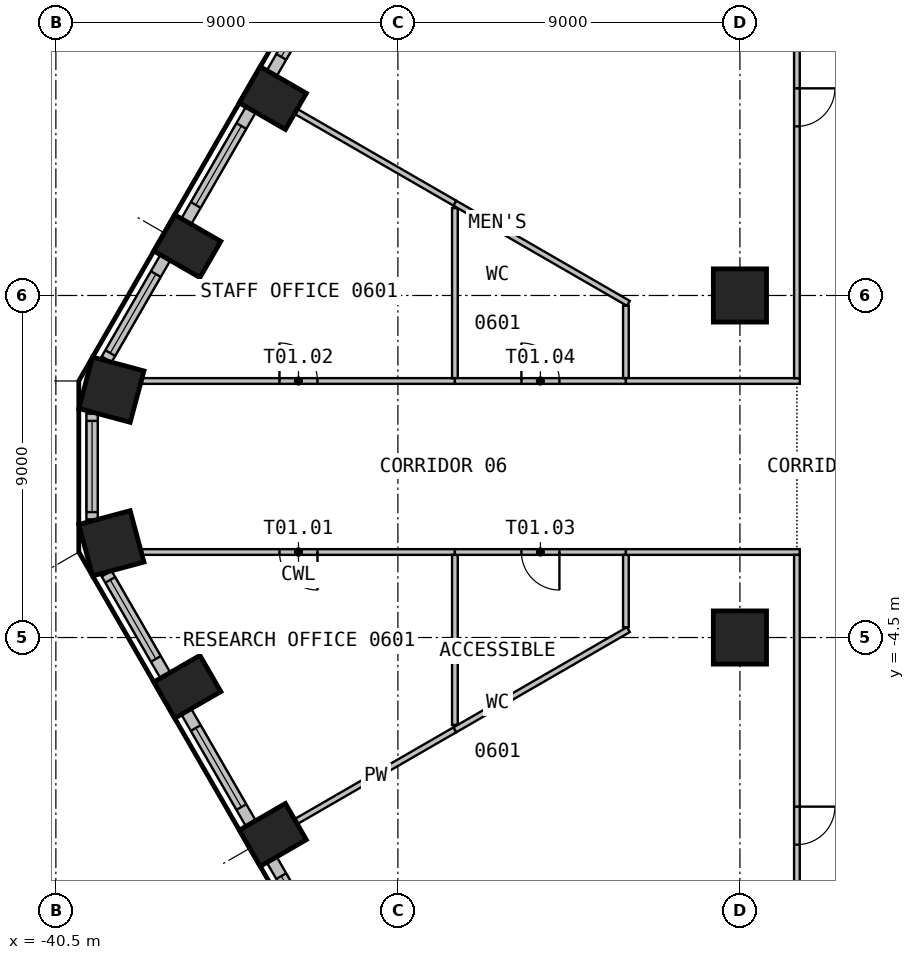
"""IFC4 building model, lengths in metres.
Left out: names, types, materials, properties, quantities, classifications, styles, units other than length and angle.
Written with IfcOpenShell. Run it as: python <this file> out.ifc"""

import sys

from ifc_helpers import new_model, si_unit, direction, frame, frame_2d, origin, origin_2d, place, context, subcontext, project, spatial, rectangle, circle, extrude, element, fill, save


model = new_model("IFC4")
c1 = context("Model", 3, precision=1e-05, world=origin(), true_north=direction((0.0, 1.0)))
c2 = subcontext(c1, "Body", "Model", "MODEL_VIEW")
j1 = project(units=[si_unit("LENGTHUNIT", "METRE"), si_unit("PLANEANGLEUNIT", "RADIAN")], contexts=[c1])
p1 = place(None, origin())
s1 = spatial("IfcSite", under=j1, at=p1, CompositionType="ELEMENT")
p2 = place(p1, origin())
s2 = spatial("IfcBuilding", under=s1, at=p2, CompositionType="ELEMENT")
p3 = place(p2, frame((0.0, 0.0, 30.0)))
s3 = spatial("IfcBuildingStorey", under=s2, at=p3, CompositionType="ELEMENT", Elevation=30.0)
for number, where, z_axis, x_axis in (
    (1, (-34.791, 9.694, 0.0), (0.0, 0.0, 1.0), (-0.5, -0.866, 0.0)),
    (2, (-37.041, 5.797, 0.0), (0.0, 0.0, 1.0), (-0.5, -0.866, 0.0)),
):
    element("IfcColumn", number, at=place(p3, frame(where, z_axis=z_axis, x_axis=x_axis)), inside=s3, PredefinedType="COLUMN", context=c2, shape_type="SweptSolid", body=[
        extrude(rectangle(XDim=1.1, YDim=1.4, at=origin_2d()), origin(), (0.0, 0.0, 1.0), 3.525),
    ])
for number, where, z_axis, x_axis in (
    (3, (-39.04, 2.02, 0.0), (0.0, 0.0, 1.0), (-0.259, -0.966, 0.0)),
    (4, (-39.04, -2.02, 0.0), (0.0, 0.0, 1.0), (0.259, -0.966, 0.0)),
):
    element("IfcColumn", number, at=place(p3, frame(where, z_axis=z_axis, x_axis=x_axis)), inside=s3, PredefinedType="COLUMN", context=c2, shape_type="SweptSolid", body=[
        extrude(rectangle(XDim=1.4, YDim=1.4, at=origin_2d()), origin(), (0.0, 0.0, 1.0), 3.525),
    ])
for number, where, z_axis, x_axis in (
    (5, (-37.041, -5.797, 0.0), (0.0, 0.0, 1.0), (0.5, -0.866, 0.0)),
    (6, (-34.791, -9.694, 0.0), (0.0, 0.0, 1.0), (0.5, -0.866, 0.0)),
):
    element("IfcColumn", number, at=place(p3, frame(where, z_axis=z_axis, x_axis=x_axis)), inside=s3, PredefinedType="COLUMN", context=c2, shape_type="SweptSolid", body=[
        extrude(rectangle(XDim=1.1, YDim=1.4, at=origin_2d()), origin(), (0.0, 0.0, 1.0), 3.525),
    ])
for number, where, z_axis, x_axis in (
    (7, (-22.5, -4.5, 0.0), (0.0, 0.0, 1.0), (1.0, 0.0, 0.0)),
    (8, (-22.5, 4.5, 0.0), (0.0, 0.0, 1.0), (1.0, 0.0, 0.0)),
):
    element("IfcColumn", number, at=place(p3, frame(where, z_axis=z_axis, x_axis=x_axis)), inside=s3, PredefinedType="COLUMN", context=c2, shape_type="SweptSolid", body=[
        extrude(circle(Radius=0.7, at=origin_2d()), origin(), (0.0, 0.0, 1.0), 3.525),
    ])
p4 = place(p3, frame((-33.119, 13.29, 0.0), z_axis=(0.0, 0.0, 1.0), x_axis=(-0.499993955907, -0.866028893315, 0.0)))
e9 = element("IfcWall", 9, at=p4, inside=s3, PredefinedType="SOLIDWALL", context=c2, shape_type="SweptSolid", body=[
    extrude(rectangle(XDim=3.399, YDim=0.3, at=frame_2d((1.699, 0.0))), origin(), (0.0, 0.0, 1.0), 3.525),
])
p5 = place(p4, frame((0.5, 0.0, 0.9)))
e10 = element("IfcOpeningElement", 10, at=p5, cuts=e9, PredefinedType="OPENING", context=c2, shape_type="SweptSolid", body=[
    extrude(rectangle(XDim=2.4, YDim=2.1, at=frame_2d((1.2, 1.05))), frame((0.0, 0.16, 0.0), z_axis=(0.0, -1.0, 0.0), x_axis=(1.0, 0.0, 0.0)), (0.0, 0.0, 1.0), 0.32),
])
p6 = place(p3, frame((-35.369, 9.393, 0.0), z_axis=(0.0, 0.0, 1.0), x_axis=(-0.499993955907, -0.866028893315, 0.0)))
e11 = element("IfcWall", 11, at=p6, inside=s3, PredefinedType="SOLIDWALL", context=c2, shape_type="SweptSolid", body=[
    extrude(rectangle(XDim=3.399, YDim=0.3, at=frame_2d((1.699, 0.0))), origin(), (0.0, 0.0, 1.0), 3.525),
])
p7 = place(p6, frame((0.5, 0.0, 0.9)))
e12 = element("IfcOpeningElement", 12, at=p7, cuts=e11, PredefinedType="OPENING", context=c2, shape_type="SweptSolid", body=[
    extrude(rectangle(XDim=2.4, YDim=2.1, at=frame_2d((1.2, 1.05))), frame((0.0, 0.16, 0.0), z_axis=(0.0, -1.0, 0.0), x_axis=(1.0, 0.0, 0.0)), (0.0, 0.0, 1.0), 0.32),
])
p8 = place(p3, frame((-37.619, 5.495, 0.0), z_axis=(0.0, 0.0, 1.0), x_axis=(-0.49997090907, -0.866042198789, 0.0)))
e13 = element("IfcWall", 13, at=p8, inside=s3, PredefinedType="SOLIDWALL", context=c2, shape_type="SweptSolid", body=[
    extrude(rectangle(XDim=3.091, YDim=0.3, at=frame_2d((1.545, 0.0))), origin(), (0.0, 0.0, 1.0), 3.525),
])
p9 = place(p8, frame((0.5, 0.0, 0.9)))
e14 = element("IfcOpeningElement", 14, at=p9, cuts=e13, PredefinedType="OPENING", context=c2, shape_type="SweptSolid", body=[
    extrude(rectangle(XDim=2.4, YDim=2.1, at=frame_2d((1.2, 1.05))), frame((0.0, 0.16, 0.0), z_axis=(0.0, -1.0, 0.0), x_axis=(1.0, 0.0, 0.0)), (0.0, 0.0, 1.0), 0.32),
])
p10 = place(p3, frame((-39.547, 1.391, 0.0), z_axis=(0.0, 0.0, 1.0), x_axis=(0.0, -1.0, 0.0)))
e15 = element("IfcWall", 15, at=p10, inside=s3, PredefinedType="SOLIDWALL", context=c2, shape_type="SweptSolid", body=[
    extrude(rectangle(XDim=2.782, YDim=0.3, at=frame_2d((1.391, 0.0))), origin(), (0.0, 0.0, 1.0), 3.525),
])
p11 = place(p10, frame((0.191, 0.0, 0.9)))
e16 = element("IfcOpeningElement", 16, at=p11, cuts=e15, PredefinedType="OPENING", context=c2, shape_type="SweptSolid", body=[
    extrude(rectangle(XDim=2.4, YDim=2.1, at=frame_2d((1.2, 1.05))), frame((0.0, 0.16, 0.0), z_axis=(0.0, -1.0, 0.0), x_axis=(1.0, 0.0, 0.0)), (0.0, 0.0, 1.0), 0.32),
])
p12 = place(p3, frame((-39.165, -2.819, 0.0), z_axis=(0.0, 0.0, 1.0), x_axis=(0.49997090907, -0.866042198789, 0.0)))
e17 = element("IfcWall", 17, at=p12, inside=s3, PredefinedType="SOLIDWALL", context=c2, shape_type="SweptSolid", body=[
    extrude(rectangle(XDim=3.091, YDim=0.3, at=frame_2d((1.545, 0.0))), origin(), (0.0, 0.0, 1.0), 3.525),
])
p13 = place(p12, frame((0.191, 0.0, 0.9)))
e18 = element("IfcOpeningElement", 18, at=p13, cuts=e17, PredefinedType="OPENING", context=c2, shape_type="SweptSolid", body=[
    extrude(rectangle(XDim=2.4, YDim=2.1, at=frame_2d((1.2, 1.05))), frame((0.0, 0.16, 0.0), z_axis=(0.0, -1.0, 0.0), x_axis=(1.0, 0.0, 0.0)), (0.0, 0.0, 1.0), 0.32),
])
p14 = place(p3, frame((-37.069, -6.449, 0.0), z_axis=(0.0, 0.0, 1.0), x_axis=(0.499993955907, -0.866028893315, 0.0)))
e19 = element("IfcWall", 19, at=p14, inside=s3, PredefinedType="SOLIDWALL", context=c2, shape_type="SweptSolid", body=[
    extrude(rectangle(XDim=3.399, YDim=0.3, at=frame_2d((1.699, 0.0))), origin(), (0.0, 0.0, 1.0), 3.525),
])
p15 = place(p14, frame((0.5, 0.0, 0.9)))
e20 = element("IfcOpeningElement", 20, at=p15, cuts=e19, PredefinedType="OPENING", context=c2, shape_type="SweptSolid", body=[
    extrude(rectangle(XDim=2.4, YDim=2.1, at=frame_2d((1.2, 1.05))), frame((0.0, 0.16, 0.0), z_axis=(0.0, -1.0, 0.0), x_axis=(1.0, 0.0, 0.0)), (0.0, 0.0, 1.0), 0.32),
])
p16 = place(p3, frame((-34.819, -10.346, 0.0), z_axis=(0.0, 0.0, 1.0), x_axis=(0.499993955907, -0.866028893315, 0.0)))
e21 = element("IfcWall", 21, at=p16, inside=s3, PredefinedType="SOLIDWALL", context=c2, shape_type="SweptSolid", body=[
    extrude(rectangle(XDim=3.399, YDim=0.3, at=frame_2d((1.699, 0.0))), origin(), (0.0, 0.0, 1.0), 3.525),
])
p17 = place(p16, frame((0.5, 0.0, 0.9)))
e22 = element("IfcOpeningElement", 22, at=p17, cuts=e21, PredefinedType="OPENING", context=c2, shape_type="SweptSolid", body=[
    extrude(rectangle(XDim=2.4, YDim=2.1, at=frame_2d((1.2, 1.05))), frame((0.0, 0.16, 0.0), z_axis=(0.0, -1.0, 0.0), x_axis=(1.0, 0.0, 0.0)), (0.0, 0.0, 1.0), 0.32),
])
p18 = place(p3, frame((-30.0, -2.25, 0.0), z_axis=(0.0, 0.0, 1.0), x_axis=(-1.0, 0.0, 0.0)))
e23 = element("IfcWall", 23, at=p18, inside=s3, PredefinedType="PARTITIONING", context=c2, shape_type="SweptSolid", body=[
    extrude(rectangle(XDim=8.233, YDim=0.15, at=frame_2d((4.116, 0.0))), origin(), (0.0, 0.0, 1.0), 3.525),
])
p19 = place(p18, frame((3.616, 0.0, 0.0)))
e24 = element("IfcOpeningElement", 24, at=p19, cuts=e23, PredefinedType="OPENING", context=c2, shape_type="SweptSolid", body=[
    extrude(rectangle(XDim=1.0, YDim=2.1, at=frame_2d((0.5, 1.05))), frame((0.0, 0.085, 0.0), z_axis=(0.0, -1.0, 0.0), x_axis=(1.0, 0.0, 0.0)), (0.0, 0.0, 1.0), 0.17),
])
p20 = place(p3, frame((-38.233, 2.25, 0.0), z_axis=(0.0, 0.0, 1.0), x_axis=(1.0, 0.0, 0.0)))
e25 = element("IfcWall", 25, at=p20, inside=s3, PredefinedType="PARTITIONING", context=c2, shape_type="SweptSolid", body=[
    extrude(rectangle(XDim=8.233, YDim=0.15, at=frame_2d((4.116, 0.0))), origin(), (0.0, 0.0, 1.0), 3.525),
])
p21 = place(p20, frame((3.616, 0.0, 0.0)))
e26 = element("IfcOpeningElement", 26, at=p21, cuts=e25, PredefinedType="OPENING", context=c2, shape_type="SweptSolid", body=[
    extrude(rectangle(XDim=1.0, YDim=2.1, at=frame_2d((0.5, 1.05))), frame((0.0, 0.085, 0.0), z_axis=(0.0, -1.0, 0.0), x_axis=(1.0, 0.0, 0.0)), (0.0, 0.0, 1.0), 0.17),
])
for number, where, z_axis, x_axis in (
    (27, (-30.0, -6.928, 0.0), (0.0, 0.0, 1.0), (-0.866, -0.5, 0.0)),
    (28, (-34.167, 9.334, 0.0), (0.0, 0.0, 1.0), (0.866, -0.5, 0.0)),
):
    element("IfcWall", number, at=place(p3, frame(where, z_axis=z_axis, x_axis=x_axis)), inside=s3, PredefinedType="PARTITIONING", context=c2, shape_type="SweptSolid", body=[
        extrude(rectangle(XDim=4.812, YDim=0.15, at=frame_2d((2.406, 0.0))), origin(), (0.0, 0.0, 1.0), 3.525),
    ])
p22 = place(p3, frame((-30.0, -2.325, 0.0), z_axis=(0.0, 0.0, 1.0), x_axis=(0.0, -1.0, 0.0)))
e29 = element("IfcWall", 29, at=p22, inside=s3, PredefinedType="PARTITIONING", context=c2, shape_type="SweptSolid", body=[
    extrude(rectangle(XDim=4.473, YDim=0.15, at=frame_2d((2.237, 0.0))), origin(), (0.0, 0.0, 1.0), 3.525),
])
p23 = place(p3, frame((-25.435, -4.292, 0.0), z_axis=(0.0, 0.0, 1.0), x_axis=(-0.866031326857, -0.499989740797, 0.0)))
e30 = element("IfcWall", 30, at=p23, inside=s3, PredefinedType="PARTITIONING", context=c2, shape_type="SweptSolid", body=[
    extrude(rectangle(XDim=5.271, YDim=0.15, at=frame_2d((2.635, 0.0))), origin(), (0.0, 0.0, 1.0), 3.525),
])
p24 = place(p3, frame((-25.5, -2.25, 0.0), z_axis=(0.0, 0.0, 1.0), x_axis=(-1.0, 0.0, 0.0)))
e31 = element("IfcWall", 31, at=p24, inside=s3, PredefinedType="PARTITIONING", context=c2, shape_type="SweptSolid", body=[
    extrude(rectangle(XDim=4.5, YDim=0.15, at=frame_2d((2.25, 0.0))), origin(), (0.0, 0.0, 1.0), 3.525),
])
p25 = place(p24, frame((1.75, 0.0, 0.0)))
e32 = element("IfcOpeningElement", 32, at=p25, cuts=e31, PredefinedType="OPENING", context=c2, shape_type="SweptSolid", body=[
    extrude(rectangle(XDim=1.0, YDim=2.1, at=frame_2d((0.5, 1.05))), frame((0.0, 0.085, 0.0), z_axis=(0.0, -1.0, 0.0), x_axis=(1.0, 0.0, 0.0)), (0.0, 0.0, 1.0), 0.17),
])
p26 = place(p3, frame((-30.0, 6.798, 0.0), z_axis=(0.0, 0.0, 1.0), x_axis=(0.0, -1.0, 0.0)))
e33 = element("IfcWall", 33, at=p26, inside=s3, PredefinedType="PARTITIONING", context=c2, shape_type="SweptSolid", body=[
    extrude(rectangle(XDim=4.473, YDim=0.15, at=frame_2d((2.237, 0.0))), origin(), (0.0, 0.0, 1.0), 3.525),
])
p27 = place(p3, frame((-30.0, 2.25, 0.0), z_axis=(0.0, 0.0, 1.0), x_axis=(1.0, 0.0, 0.0)))
e34 = element("IfcWall", 34, at=p27, inside=s3, PredefinedType="PARTITIONING", context=c2, shape_type="SweptSolid", body=[
    extrude(rectangle(XDim=4.5, YDim=0.15, at=frame_2d((2.25, 0.0))), origin(), (0.0, 0.0, 1.0), 3.525),
])
p28 = place(p27, frame((1.75, 0.0, 0.0)))
e35 = element("IfcOpeningElement", 35, at=p28, cuts=e34, PredefinedType="OPENING", context=c2, shape_type="SweptSolid", body=[
    extrude(rectangle(XDim=1.0, YDim=2.1, at=frame_2d((0.5, 1.05))), frame((0.0, 0.085, 0.0), z_axis=(0.0, -1.0, 0.0), x_axis=(1.0, 0.0, 0.0)), (0.0, 0.0, 1.0), 0.17),
])
p29 = place(p3, frame((-30.0, 6.928, 0.0), z_axis=(0.0, 0.0, 1.0), x_axis=(0.866031326857, -0.499989740797, 0.0)))
e36 = element("IfcWall", 36, at=p29, inside=s3, PredefinedType="PARTITIONING", context=c2, shape_type="SweptSolid", body=[
    extrude(rectangle(XDim=5.271, YDim=0.15, at=frame_2d((2.635, 0.0))), origin(), (0.0, 0.0, 1.0), 3.525),
])
p30 = place(p3, frame((-25.5, -2.325, 0.0), z_axis=(0.0, 0.0, 1.0), x_axis=(0.0, -1.0, 0.0)))
e37 = element("IfcWall", 37, at=p30, inside=s3, PredefinedType="PARTITIONING", context=c2, shape_type="SweptSolid", body=[
    extrude(rectangle(XDim=1.905, YDim=0.15, at=frame_2d((0.953, 0.0))), origin(), (0.0, 0.0, 1.0), 3.525),
])
p31 = place(p3, frame((-20.925, -2.25, 0.0), z_axis=(0.0, 0.0, 1.0), x_axis=(-1.0, 0.0, 0.0)))
e38 = element("IfcWall", 38, at=p31, inside=s3, PredefinedType="PARTITIONING", context=c2, shape_type="SweptSolid", body=[
    extrude(rectangle(XDim=4.575, YDim=0.15, at=frame_2d((2.288, 0.0))), origin(), (0.0, 0.0, 1.0), 3.525),
])
p32 = place(p3, frame((-25.5, 4.23, 0.0), z_axis=(0.0, 0.0, 1.0), x_axis=(0.0, -1.0, 0.0)))
e39 = element("IfcWall", 39, at=p32, inside=s3, PredefinedType="PARTITIONING", context=c2, shape_type="SweptSolid", body=[
    extrude(rectangle(XDim=1.905, YDim=0.15, at=frame_2d((0.953, 0.0))), origin(), (0.0, 0.0, 1.0), 3.525),
])
p33 = place(p3, frame((-25.5, 2.25, 0.0), z_axis=(0.0, 0.0, 1.0), x_axis=(1.0, 0.0, 0.0)))
e40 = element("IfcWall", 40, at=p33, inside=s3, PredefinedType="PARTITIONING", context=c2, shape_type="SweptSolid", body=[
    extrude(rectangle(XDim=4.575, YDim=0.15, at=frame_2d((2.288, 0.0))), origin(), (0.0, 0.0, 1.0), 3.525),
])
p34 = place(p3, frame((-21.0, -2.325, 0.0), z_axis=(0.0, 0.0, 1.0), x_axis=(0.0, -1.0, 0.0)))
e41 = element("IfcWall", 41, at=p34, inside=s3, PredefinedType="PARTITIONING", context=c2, shape_type="SweptSolid", body=[
    extrude(rectangle(XDim=14.25, YDim=0.15, at=frame_2d((7.125, 0.0))), origin(), (0.0, 0.0, 1.0), 3.525),
])
p35 = place(p34, frame((6.625, 0.0, 0.0)))
e42 = element("IfcOpeningElement", 42, at=p35, cuts=e41, PredefinedType="OPENING", context=c2, shape_type="SweptSolid", body=[
    extrude(rectangle(XDim=1.0, YDim=2.1, at=frame_2d((0.5, 1.05))), frame((0.0, 0.085, 0.0), z_axis=(0.0, -1.0, 0.0), x_axis=(1.0, 0.0, 0.0)), (0.0, 0.0, 1.0), 0.17),
])
p36 = place(p3, frame((-21.0, 16.575, 0.0), z_axis=(0.0, 0.0, 1.0), x_axis=(0.0, -1.0, 0.0)))
e43 = element("IfcWall", 43, at=p36, inside=s3, PredefinedType="PARTITIONING", context=c2, shape_type="SweptSolid", body=[
    extrude(rectangle(XDim=14.25, YDim=0.15, at=frame_2d((7.125, 0.0))), origin(), (0.0, 0.0, 1.0), 3.525),
])
p37 = place(p36, frame((6.625, 0.0, 0.0)))
e44 = element("IfcOpeningElement", 44, at=p37, cuts=e43, PredefinedType="OPENING", context=c2, shape_type="SweptSolid", body=[
    extrude(rectangle(XDim=1.0, YDim=2.1, at=frame_2d((0.5, 1.05))), frame((0.0, 0.085, 0.0), z_axis=(0.0, -1.0, 0.0), x_axis=(1.0, 0.0, 0.0)), (0.0, 0.0, 1.0), 0.17),
])
p38 = place(p5, origin())
e45 = element("IfcWindow", 45, at=p38, inside=s3, PartitioningType="SINGLE_PANEL", PredefinedType="WINDOW", context=c2, shape_type="SweptSolid", body=[
    extrude(rectangle(XDim=2.4, YDim=2.1, at=frame_2d((1.2, 1.05))), frame((0.0, 0.03, 0.0), z_axis=(0.0, -1.0, 0.0), x_axis=(1.0, 0.0, 0.0)), (0.0, 0.0, 1.0), 0.06),
])
fill(e10, e45)
p39 = place(p7, origin())
e46 = element("IfcWindow", 46, at=p39, inside=s3, PartitioningType="SINGLE_PANEL", PredefinedType="WINDOW", context=c2, shape_type="SweptSolid", body=[
    extrude(rectangle(XDim=2.4, YDim=2.1, at=frame_2d((1.2, 1.05))), frame((0.0, 0.03, 0.0), z_axis=(0.0, -1.0, 0.0), x_axis=(1.0, 0.0, 0.0)), (0.0, 0.0, 1.0), 0.06),
])
fill(e12, e46)
p40 = place(p9, origin())
e47 = element("IfcWindow", 47, at=p40, inside=s3, PartitioningType="SINGLE_PANEL", PredefinedType="WINDOW", context=c2, shape_type="SweptSolid", body=[
    extrude(rectangle(XDim=2.4, YDim=2.1, at=frame_2d((1.2, 1.05))), frame((0.0, 0.03, 0.0), z_axis=(0.0, -1.0, 0.0), x_axis=(1.0, 0.0, 0.0)), (0.0, 0.0, 1.0), 0.06),
])
fill(e14, e47)
p41 = place(p11, origin())
e48 = element("IfcWindow", 48, at=p41, inside=s3, PartitioningType="SINGLE_PANEL", PredefinedType="WINDOW", context=c2, shape_type="SweptSolid", body=[
    extrude(rectangle(XDim=2.4, YDim=2.1, at=frame_2d((1.2, 1.05))), frame((0.0, 0.03, 0.0), z_axis=(0.0, -1.0, 0.0), x_axis=(1.0, 0.0, 0.0)), (0.0, 0.0, 1.0), 0.06),
])
fill(e16, e48)
p42 = place(p13, origin())
e49 = element("IfcWindow", 49, at=p42, inside=s3, PartitioningType="SINGLE_PANEL", PredefinedType="WINDOW", context=c2, shape_type="SweptSolid", body=[
    extrude(rectangle(XDim=2.4, YDim=2.1, at=frame_2d((1.2, 1.05))), frame((0.0, 0.03, 0.0), z_axis=(0.0, -1.0, 0.0), x_axis=(1.0, 0.0, 0.0)), (0.0, 0.0, 1.0), 0.06),
])
fill(e18, e49)
p43 = place(p15, origin())
e50 = element("IfcWindow", 50, at=p43, inside=s3, PartitioningType="SINGLE_PANEL", PredefinedType="WINDOW", context=c2, shape_type="SweptSolid", body=[
    extrude(rectangle(XDim=2.4, YDim=2.1, at=frame_2d((1.2, 1.05))), frame((0.0, 0.03, 0.0), z_axis=(0.0, -1.0, 0.0), x_axis=(1.0, 0.0, 0.0)), (0.0, 0.0, 1.0), 0.06),
])
fill(e20, e50)
p44 = place(p17, origin())
e51 = element("IfcWindow", 51, at=p44, inside=s3, PartitioningType="SINGLE_PANEL", PredefinedType="WINDOW", context=c2, shape_type="SweptSolid", body=[
    extrude(rectangle(XDim=2.4, YDim=2.1, at=frame_2d((1.2, 1.05))), frame((0.0, 0.03, 0.0), z_axis=(0.0, -1.0, 0.0), x_axis=(1.0, 0.0, 0.0)), (0.0, 0.0, 1.0), 0.06),
])
fill(e22, e51)
p45 = place(p19, origin())
e52 = element("IfcDoor", 52, at=p45, inside=s3, OperationType="SINGLE_SWING_RIGHT", PredefinedType="DOOR", context=c2, shape_type="SweptSolid", body=[
    extrude(rectangle(XDim=1.0, YDim=2.1, at=frame_2d((0.5, 1.05))), frame((0.0, 0.025, 0.0), z_axis=(0.0, -1.0, 0.0), x_axis=(1.0, 0.0, 0.0)), (0.0, 0.0, 1.0), 0.05),
])
fill(e24, e52)
p46 = place(p21, origin())
e53 = element("IfcDoor", 53, at=p46, inside=s3, OperationType="SINGLE_SWING_LEFT", PredefinedType="DOOR", context=c2, shape_type="SweptSolid", body=[
    extrude(rectangle(XDim=1.0, YDim=2.1, at=frame_2d((0.5, 1.05))), frame((0.0, 0.025, 0.0), z_axis=(0.0, -1.0, 0.0), x_axis=(1.0, 0.0, 0.0)), (0.0, 0.0, 1.0), 0.05),
])
fill(e26, e53)
p47 = place(p25, origin())
e54 = element("IfcDoor", 54, at=p47, inside=s3, OperationType="SINGLE_SWING_RIGHT", PredefinedType="DOOR", context=c2, shape_type="SweptSolid", body=[
    extrude(rectangle(XDim=1.0, YDim=2.1, at=frame_2d((0.5, 1.05))), frame((0.0, 0.025, 0.0), z_axis=(0.0, -1.0, 0.0), x_axis=(1.0, 0.0, 0.0)), (0.0, 0.0, 1.0), 0.05),
])
fill(e32, e54)
p48 = place(p28, origin())
e55 = element("IfcDoor", 55, at=p48, inside=s3, OperationType="SINGLE_SWING_RIGHT", PredefinedType="DOOR", context=c2, shape_type="SweptSolid", body=[
    extrude(rectangle(XDim=1.0, YDim=2.1, at=frame_2d((0.5, 1.05))), frame((0.0, 0.025, 0.0), z_axis=(0.0, -1.0, 0.0), x_axis=(1.0, 0.0, 0.0)), (0.0, 0.0, 1.0), 0.05),
])
fill(e35, e55)
p49 = place(p35, origin())
e56 = element("IfcDoor", 56, at=p49, inside=s3, OperationType="SINGLE_SWING_LEFT", PredefinedType="DOOR", context=c2, shape_type="SweptSolid", body=[
    extrude(rectangle(XDim=1.0, YDim=2.1, at=frame_2d((0.5, 1.05))), frame((0.0, 0.025, 0.0), z_axis=(0.0, -1.0, 0.0), x_axis=(1.0, 0.0, 0.0)), (0.0, 0.0, 1.0), 0.05),
])
fill(e42, e56)
p50 = place(p37, origin())
e57 = element("IfcDoor", 57, at=p50, inside=s3, OperationType="SINGLE_SWING_RIGHT", PredefinedType="DOOR", context=c2, shape_type="SweptSolid", body=[
    extrude(rectangle(XDim=1.0, YDim=2.1, at=frame_2d((0.5, 1.05))), frame((0.0, 0.025, 0.0), z_axis=(0.0, -1.0, 0.0), x_axis=(1.0, 0.0, 0.0)), (0.0, 0.0, 1.0), 0.05),
])
fill(e44, e57)
save(model, sys.argv[1])
